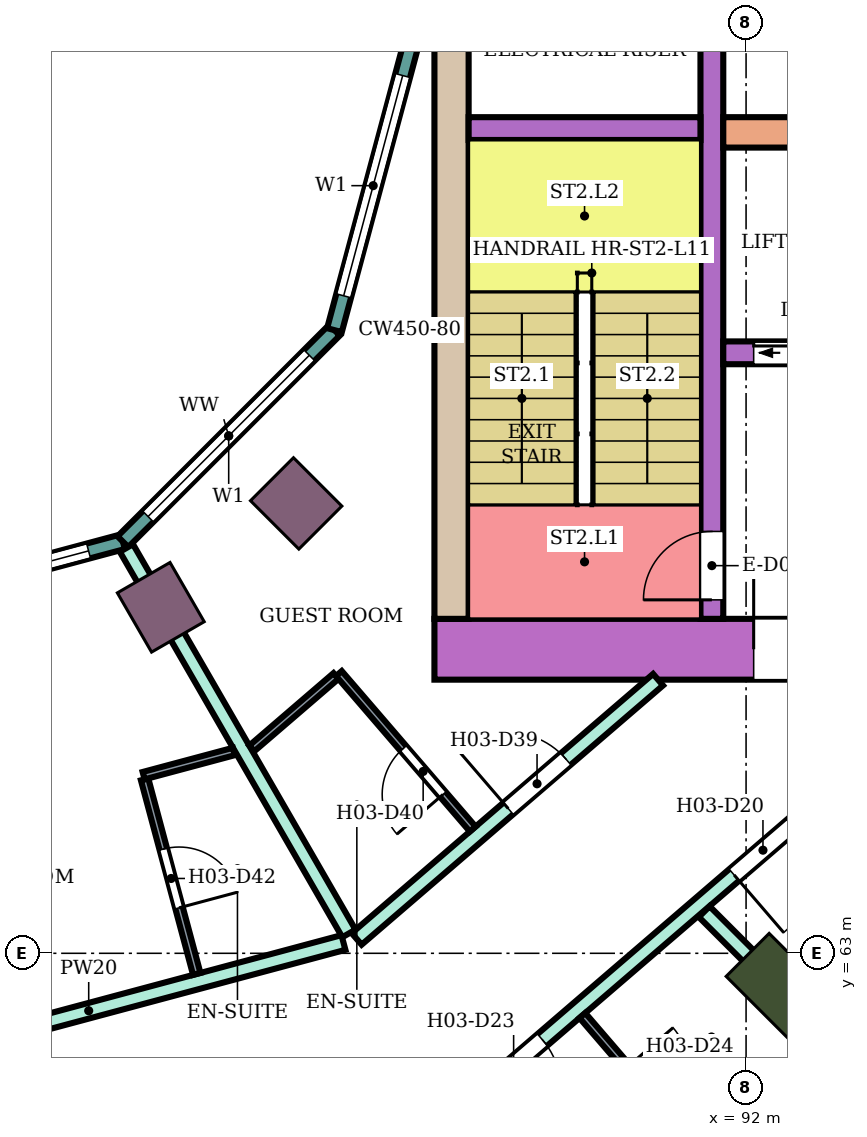
"""IFC4 building model, lengths in metres.
Left out: names, types, materials, properties, quantities, classifications, styles, units other than length and angle.
Written with IfcOpenShell. Run it as: python <this file> out.ifc"""

import sys

from ifc_helpers import new_model, si_unit, direction, frame, frame_2d, origin, origin_2d, place, context, subcontext, project, spatial, rectangle, extrude, element, fill, save


model = new_model("IFC4")
c1 = context("Model", 3, precision=1e-05, world=origin(), true_north=direction((0.0, 1.0)))
c2 = subcontext(c1, "Body", "Model", "MODEL_VIEW")
j1 = project(units=[si_unit("LENGTHUNIT", "METRE"), si_unit("PLANEANGLEUNIT", "RADIAN")], contexts=[c1])
p1 = place(None, origin())
s1 = spatial("IfcSite", under=j1, at=p1, CompositionType="ELEMENT")
p2 = place(p1, origin())
s2 = spatial("IfcBuilding", under=s1, at=p2, CompositionType="ELEMENT")
p3 = place(p2, frame((0.0, 0.0, 51.6)))
s3 = spatial("IfcBuildingStorey", under=s2, at=p3, CompositionType="ELEMENT", Elevation=51.6)
p4 = place(p3, frame((92.445, 62.555, 0.0), z_axis=(0.0, 0.0, 1.0), x_axis=(0.707106781187, -0.707106781187, 0.0)))
e1 = element("IfcColumn", 1, at=p4, inside=s3, PredefinedType="COLUMN", context=c2, shape_type="SweptSolid", body=[
    extrude(rectangle(XDim=1.2, YDim=0.8, at=origin_2d()), origin(), (0.0, 0.0, 1.0), 3.8),
])
for number, where, z_axis, x_axis in (
    (2, (84.3, 67.552, 0.0), (0.0, 0.0, 1.0), (0.5, -0.866, 0.0)),
    (3, (86.081, 68.919, 0.0), (0.0, 0.0, 1.0), (0.707, -0.707, 0.0)),
):
    element("IfcColumn", number, at=place(p3, frame(where, z_axis=z_axis, x_axis=x_axis)), inside=s3, PredefinedType="COLUMN", context=c2, shape_type="SweptSolid", body=[
        extrude(rectangle(XDim=0.9, YDim=0.8, at=origin_2d()), origin(), (0.0, 0.0, 1.0), 3.8),
    ])
p5 = place(p3, frame((87.9, 67.0, 0.0), z_axis=(0.0, 0.0, 1.0), x_axis=(1.0, 0.0, 0.0)))
e4 = element("IfcWall", 4, at=p5, inside=s3, PredefinedType="SHEAR", context=c2, shape_type="SweptSolid", body=[
    extrude(rectangle(XDim=14.7, YDim=0.8, at=frame_2d((7.35, 0.0))), origin(), (0.0, 0.0, 1.0), 3.48),
])
p6 = place(p5, frame((4.2, 0.0, 0.0)))
e5 = element("IfcOpeningElement", 5, at=p6, cuts=e4, PredefinedType="OPENING", context=c2, shape_type="SweptSolid", body=[
    extrude(rectangle(XDim=2.4, YDim=2.4, at=frame_2d((1.2, 1.2))), frame((0.0, 0.41, 0.0), z_axis=(0.0, -1.0, 0.0), x_axis=(1.0, 0.0, 0.0)), (0.0, 0.0, 1.0), 0.82),
])
p7 = place(p3, frame((88.125, 67.4, 0.0), z_axis=(0.0, 0.0, 1.0), x_axis=(0.0, 1.0, 0.0)))
e6 = element("IfcWall", 6, at=p7, inside=s3, PredefinedType="SHEAR", context=c2, shape_type="SweptSolid", body=[
    extrude(rectangle(XDim=7.6, YDim=0.45, at=frame_2d((3.8, 0.0))), origin(), (0.0, 0.0, 1.0), 3.48),
])
p8 = place(p3, frame((91.55, 67.4, 0.0), z_axis=(0.0, 0.0, 1.0), x_axis=(0.0, 1.0, 0.0)))
e7 = element("IfcWall", 7, at=p8, inside=s3, PredefinedType="SHEAR", context=c2, shape_type="SweptSolid", body=[
    extrude(rectangle(XDim=7.6, YDim=0.3, at=frame_2d((3.8, 0.0))), origin(), (0.0, 0.0, 1.0), 3.48),
])
p9 = place(p8, frame((0.25, 0.0, 0.0)))
e8 = element("IfcOpeningElement", 8, at=p9, cuts=e7, PredefinedType="OPENING", context=c2, shape_type="SweptSolid", body=[
    extrude(rectangle(XDim=0.9, YDim=2.1, at=frame_2d((0.45, 1.05))), frame((0.0, 0.16, 0.0), z_axis=(0.0, -1.0, 0.0), x_axis=(1.0, 0.0, 0.0)), (0.0, 0.0, 1.0), 0.32),
])
p10 = place(p3, frame((88.35, 73.85, 0.0), z_axis=(0.0, 0.0, 1.0), x_axis=(1.0, 0.0, 0.0)))
e9 = element("IfcWall", 9, at=p10, inside=s3, PredefinedType="SHEAR", context=c2, shape_type="SweptSolid", body=[
    extrude(rectangle(XDim=3.05, YDim=0.3, at=frame_2d((1.525, 0.0))), origin(), (0.0, 0.0, 1.0), 3.48),
])
p11 = place(p3, frame((91.7, 73.8, 0.0), z_axis=(0.0, 0.0, 1.0), x_axis=(1.0, 0.0, 0.0)))
e10 = element("IfcWall", 10, at=p11, inside=s3, PredefinedType="SHEAR", context=c2, shape_type="SweptSolid", body=[
    extrude(rectangle(XDim=10.9, YDim=0.4, at=frame_2d((5.45, 0.0))), origin(), (0.0, 0.0, 1.0), 3.48),
])
p12 = place(p3, frame((91.7, 70.9, 0.0), z_axis=(0.0, 0.0, 1.0), x_axis=(1.0, 0.0, 0.0)))
e11 = element("IfcWall", 11, at=p12, inside=s3, PredefinedType="SHEAR", context=c2, shape_type="SweptSolid", body=[
    extrude(rectangle(XDim=10.9, YDim=0.3, at=frame_2d((5.45, 0.0))), origin(), (0.0, 0.0, 1.0), 3.48),
])
p13 = place(p12, frame((0.4, 0.0, 0.0)))
e12 = element("IfcOpeningElement", 12, at=p13, cuts=e11, PredefinedType="OPENING", context=c2, shape_type="SweptSolid", body=[
    extrude(rectangle(XDim=1.4, YDim=2.1, at=frame_2d((0.7, 1.05))), frame((0.0, 0.16, 0.0), z_axis=(0.0, -1.0, 0.0), x_axis=(1.0, 0.0, 0.0)), (0.0, 0.0, 1.0), 0.32),
])
p14 = place(p12, frame((5.4, 0.0, 0.0)))
e13 = element("IfcOpeningElement", 13, at=p14, cuts=e11, PredefinedType="OPENING", context=c2, shape_type="SweptSolid", body=[
    extrude(rectangle(XDim=1.4, YDim=2.1, at=frame_2d((0.7, 1.05))), frame((0.0, 0.16, 0.0), z_axis=(0.0, -1.0, 0.0), x_axis=(1.0, 0.0, 0.0)), (0.0, 0.0, 1.0), 0.32),
])
p15 = place(p12, frame((8.1, 0.0, 0.0)))
e14 = element("IfcOpeningElement", 14, at=p15, cuts=e11, PredefinedType="OPENING", context=c2, shape_type="SweptSolid", body=[
    extrude(rectangle(XDim=1.0, YDim=2.1, at=frame_2d((0.5, 1.05))), frame((0.0, 0.16, 0.0), z_axis=(0.0, -1.0, 0.0), x_axis=(1.0, 0.0, 0.0)), (0.0, 0.0, 1.0), 0.32),
])
p16 = place(p3, frame((80.0, 67.396, 0.0), z_axis=(0.0, 0.0, 1.0), x_axis=(0.965933654434, 0.258789828301, 0.0)))
e15 = element("IfcWall", 15, at=p16, inside=s3, PredefinedType="NOTDEFINED", context=c2, shape_type="SweptSolid", body=[
    extrude(rectangle(XDim=3.936, YDim=0.2, at=frame_2d((1.968, 0.0))), origin(), (0.0, 0.0, 1.0), 3.8),
])
p17 = place(p16, frame((0.468, 0.0, 0.9)))
e16 = element("IfcOpeningElement", 16, at=p17, cuts=e15, PredefinedType="OPENING", context=c2, shape_type="SweptSolid", body=[
    extrude(rectangle(XDim=3.0, YDim=2.3, at=frame_2d((1.5, 1.15))), frame((0.0, 0.11, 0.0), z_axis=(0.0, -1.0, 0.0), x_axis=(1.0, 0.0, 0.0)), (0.0, 0.0, 1.0), 0.22),
])
p18 = place(p3, frame((83.802, 68.415, 0.0), z_axis=(0.0, 0.0, 1.0), x_axis=(0.707106781187, 0.707106781187, 0.0)))
e17 = element("IfcWall", 17, at=p18, inside=s3, PredefinedType="NOTDEFINED", context=c2, shape_type="SweptSolid", body=[
    extrude(rectangle(XDim=3.936, YDim=0.2, at=frame_2d((1.968, 0.0))), origin(), (0.0, 0.0, 1.0), 3.8),
])
p19 = place(p18, frame((0.468, 0.0, 0.9)))
e18 = element("IfcOpeningElement", 18, at=p19, cuts=e17, PredefinedType="OPENING", context=c2, shape_type="SweptSolid", body=[
    extrude(rectangle(XDim=3.0, YDim=2.3, at=frame_2d((1.5, 1.15))), frame((0.0, 0.11, 0.0), z_axis=(0.0, -1.0, 0.0), x_axis=(1.0, 0.0, 0.0)), (0.0, 0.0, 1.0), 0.22),
])
p20 = place(p3, frame((86.585, 71.198, 0.0), z_axis=(0.0, 0.0, 1.0), x_axis=(0.258789828301, 0.965933654434, 0.0)))
e19 = element("IfcWall", 19, at=p20, inside=s3, PredefinedType="NOTDEFINED", context=c2, shape_type="SweptSolid", body=[
    extrude(rectangle(XDim=3.936, YDim=0.2, at=frame_2d((1.968, 0.0))), origin(), (0.0, 0.0, 1.0), 3.8),
])
p21 = place(p20, frame((0.468, 0.0, 0.9)))
e20 = element("IfcOpeningElement", 20, at=p21, cuts=e19, PredefinedType="OPENING", context=c2, shape_type="SweptSolid", body=[
    extrude(rectangle(XDim=3.0, YDim=2.3, at=frame_2d((1.5, 1.15))), frame((0.0, 0.11, 0.0), z_axis=(0.0, -1.0, 0.0), x_axis=(1.0, 0.0, 0.0)), (0.0, 0.0, 1.0), 0.22),
])
p22 = place(p3, frame((80.0, 61.346, 0.0), z_axis=(0.0, 0.0, 1.0), x_axis=(0.965924181808, 0.258825182312, 0.0)))
e21 = element("IfcWall", 21, at=p22, inside=s3, PredefinedType="PARTITIONING", context=c2, shape_type="SweptSolid", body=[
    extrude(rectangle(XDim=6.94, YDim=0.2, at=frame_2d((3.47, 0.0))), origin(), (0.0, 0.0, 1.0), 3.35),
])
p23 = place(p22, frame((0.55, 0.0, 0.0)))
e22 = element("IfcOpeningElement", 22, at=p23, cuts=e21, PredefinedType="OPENING", context=c2, shape_type="SweptSolid", body=[
    extrude(rectangle(XDim=1.0, YDim=2.1, at=frame_2d((0.5, 1.05))), frame((0.0, 0.11, 0.0), z_axis=(0.0, -1.0, 0.0), x_axis=(1.0, 0.0, 0.0)), (0.0, 0.0, 1.0), 0.22),
])
p24 = place(p3, frame((83.848, 68.332, 0.0), z_axis=(0.0, 0.0, 1.0), x_axis=(0.499901724708, -0.866082135617, 0.0)))
e23 = element("IfcWall", 23, at=p24, inside=s3, PredefinedType="PARTITIONING", context=c2, shape_type="SweptSolid", body=[
    extrude(rectangle(XDim=5.855, YDim=0.2, at=frame_2d((2.928, 0.0))), origin(), (0.0, 0.0, 1.0), 3.35),
])
p25 = place(p3, frame((86.877, 63.189, 0.0), z_axis=(0.0, 0.0, 1.0), x_axis=(0.758164888471, 0.652062881853, 0.0)))
e24 = element("IfcWall", 24, at=p25, inside=s3, PredefinedType="PARTITIONING", context=c2, shape_type="SweptSolid", body=[
    extrude(rectangle(XDim=5.23, YDim=0.2, at=frame_2d((2.615, 0.0))), origin(), (0.0, 0.0, 1.0), 3.35),
])
p26 = place(p25, frame((2.63, 0.0, 0.0)))
e25 = element("IfcOpeningElement", 25, at=p26, cuts=e24, PredefinedType="OPENING", context=c2, shape_type="SweptSolid", body=[
    extrude(rectangle(XDim=1.0, YDim=2.1, at=frame_2d((0.5, 1.05))), frame((0.0, 0.11, 0.0), z_axis=(0.0, -1.0, 0.0), x_axis=(1.0, 0.0, 0.0)), (0.0, 0.0, 1.0), 0.22),
])
p27 = place(p3, frame((88.236, 60.929, 0.0), z_axis=(0.0, 0.0, 1.0), x_axis=(0.758227485202, 0.651990092474, 0.0)))
e26 = element("IfcWall", 26, at=p27, inside=s3, PredefinedType="PARTITIONING", context=c2, shape_type="SweptSolid", body=[
    extrude(rectangle(XDim=6.336, YDim=0.2, at=frame_2d((3.168, 0.0))), origin(), (0.0, 0.0, 1.0), 3.35),
])
p28 = place(p27, frame((4.757, 0.0, 0.0)))
e27 = element("IfcOpeningElement", 27, at=p28, cuts=e26, PredefinedType="OPENING", context=c2, shape_type="SweptSolid", body=[
    extrude(rectangle(XDim=1.0, YDim=2.1, at=frame_2d((0.5, 1.05))), frame((0.0, 0.11, 0.0), z_axis=(0.0, -1.0, 0.0), x_axis=(1.0, 0.0, 0.0)), (0.0, 0.0, 1.0), 0.22),
])
p29 = place(p27, frame((0.43, 0.0, 0.0)))
e28 = element("IfcOpeningElement", 28, at=p29, cuts=e26, PredefinedType="OPENING", context=c2, shape_type="SweptSolid", body=[
    extrude(rectangle(XDim=1.0, YDim=2.1, at=frame_2d((0.5, 1.05))), frame((0.0, 0.11, 0.0), z_axis=(0.0, -1.0, 0.0), x_axis=(1.0, 0.0, 0.0)), (0.0, 0.0, 1.0), 0.22),
])
p30 = place(p3, frame((91.449, 63.548, 0.0), z_axis=(0.0, 0.0, 1.0), x_axis=(0.706984810649, -0.707228730688, 0.0)))
e29 = element("IfcWall", 29, at=p30, inside=s3, PredefinedType="PARTITIONING", context=c2, shape_type="SweptSolid", body=[
    extrude(rectangle(XDim=7.006, YDim=0.2, at=frame_2d((3.503, 0.0))), origin(), (0.0, 0.0, 1.0), 3.35),
])
p31 = place(p3, frame((84.087, 65.289, 0.0), z_axis=(0.0, 0.0, 1.0), x_axis=(0.258929459649, -0.965896234037, 0.0)))
e30 = element("IfcWall", 30, at=p31, inside=s3, PredefinedType="PARTITIONING", context=c2, shape_type="SweptSolid", body=[
    extrude(rectangle(XDim=2.65, YDim=0.1, at=frame_2d((1.325, 0.0))), origin(), (0.0, 0.0, 1.0), 3.35),
])
p32 = place(p31, frame((0.95, 0.0, 0.0)))
e31 = element("IfcOpeningElement", 31, at=p32, cuts=e30, PredefinedType="OPENING", context=c2, shape_type="SweptSolid", body=[
    extrude(rectangle(XDim=0.8, YDim=2.1, at=frame_2d((0.4, 1.05))), frame((0.0, 0.06, 0.0), z_axis=(0.0, -1.0, 0.0), x_axis=(1.0, 0.0, 0.0)), (0.0, 0.0, 1.0), 0.12),
])
p33 = place(p3, frame((84.074, 65.337, 0.0), z_axis=(0.0, 0.0, 1.0), x_axis=(0.965914351064, 0.258861867428, 0.0)))
e32 = element("IfcWall", 32, at=p33, inside=s3, PredefinedType="PARTITIONING", context=c2, shape_type="SweptSolid", body=[
    extrude(rectangle(XDim=1.229, YDim=0.1, at=frame_2d((0.615, 0.0))), origin(), (0.0, 0.0, 1.0), 3.35),
])
p34 = place(p3, frame((85.497, 65.696, 0.0), z_axis=(0.0, 0.0, 1.0), x_axis=(0.75817032582, 0.652056559698, 0.0)))
e33 = element("IfcWall", 33, at=p34, inside=s3, PredefinedType="PARTITIONING", context=c2, shape_type="SweptSolid", body=[
    extrude(rectangle(XDim=1.461, YDim=0.1, at=frame_2d((0.73, 0.0))), origin(), (0.0, 0.0, 1.0), 3.35),
])
p35 = place(p3, frame((86.643, 66.681, 0.0), z_axis=(0.0, 0.0, 1.0), x_axis=(0.652264876065, -0.757991115682, 0.0)))
e34 = element("IfcWall", 34, at=p35, inside=s3, PredefinedType="PARTITIONING", context=c2, shape_type="SweptSolid", body=[
    extrude(rectangle(XDim=2.699, YDim=0.1, at=frame_2d((1.35, 0.0))), origin(), (0.0, 0.0, 1.0), 3.35),
])
p36 = place(p35, frame((1.3, 0.0, 0.0)))
e35 = element("IfcOpeningElement", 35, at=p36, cuts=e34, PredefinedType="OPENING", context=c2, shape_type="SweptSolid", body=[
    extrude(rectangle(XDim=0.8, YDim=2.1, at=frame_2d((0.4, 1.05))), frame((0.0, 0.06, 0.0), z_axis=(0.0, -1.0, 0.0), x_axis=(1.0, 0.0, 0.0)), (0.0, 0.0, 1.0), 0.12),
])
p37 = place(p3, frame((89.846, 62.182, 0.0), z_axis=(0.0, 0.0, 1.0), x_axis=(0.652095405055, -0.758136915541, 0.0)))
e36 = element("IfcWall", 36, at=p37, inside=s3, PredefinedType="PARTITIONING", context=c2, shape_type="SweptSolid", body=[
    extrude(rectangle(XDim=2.65, YDim=0.1, at=frame_2d((1.325, 0.0))), origin(), (0.0, 0.0, 1.0), 3.35),
])
p38 = place(p37, frame((0.9, 0.0, 0.0)))
e37 = element("IfcOpeningElement", 37, at=p38, cuts=e36, PredefinedType="OPENING", context=c2, shape_type="SweptSolid", body=[
    extrude(rectangle(XDim=0.8, YDim=2.1, at=frame_2d((0.4, 1.05))), frame((0.0, 0.06, 0.0), z_axis=(0.0, -1.0, 0.0), x_axis=(1.0, 0.0, 0.0)), (0.0, 0.0, 1.0), 0.12),
])
p39 = place(p17, origin())
e38 = element("IfcWindow", 38, at=p39, inside=s3, PartitioningType="SINGLE_PANEL", PredefinedType="WINDOW", context=c2, shape_type="SweptSolid", body=[
    extrude(rectangle(XDim=3.0, YDim=2.3, at=frame_2d((1.5, 1.15))), frame((0.0, 0.03, 0.0), z_axis=(0.0, -1.0, 0.0), x_axis=(1.0, 0.0, 0.0)), (0.0, 0.0, 1.0), 0.06),
])
fill(e16, e38)
p40 = place(p19, origin())
e39 = element("IfcWindow", 39, at=p40, inside=s3, PartitioningType="SINGLE_PANEL", PredefinedType="WINDOW", context=c2, shape_type="SweptSolid", body=[
    extrude(rectangle(XDim=3.0, YDim=2.3, at=frame_2d((1.5, 1.15))), frame((0.0, 0.03, 0.0), z_axis=(0.0, -1.0, 0.0), x_axis=(1.0, 0.0, 0.0)), (0.0, 0.0, 1.0), 0.06),
])
fill(e18, e39)
p41 = place(p21, origin())
e40 = element("IfcWindow", 40, at=p41, inside=s3, PartitioningType="SINGLE_PANEL", PredefinedType="WINDOW", context=c2, shape_type="SweptSolid", body=[
    extrude(rectangle(XDim=3.0, YDim=2.3, at=frame_2d((1.5, 1.15))), frame((0.0, 0.03, 0.0), z_axis=(0.0, -1.0, 0.0), x_axis=(1.0, 0.0, 0.0)), (0.0, 0.0, 1.0), 0.06),
])
fill(e20, e40)
p42 = place(p28, frame((1.0, 0.0, 0.0), z_axis=(0.0, 0.0, 1.0), x_axis=(-1.0, 0.0, 0.0)))
e41 = element("IfcDoor", 41, at=p42, inside=s3, OperationType="SINGLE_SWING_RIGHT", PredefinedType="DOOR", context=c2, shape_type="SweptSolid", body=[
    extrude(rectangle(XDim=1.0, YDim=2.1, at=frame_2d((0.5, 1.05))), frame((0.0, 0.025, 0.0), z_axis=(0.0, -1.0, 0.0), x_axis=(1.0, 0.0, 0.0)), (0.0, 0.0, 1.0), 0.05),
])
fill(e27, e41)
p43 = place(p29, frame((1.0, 0.0, 0.0), z_axis=(0.0, 0.0, 1.0), x_axis=(-1.0, 0.0, 0.0)))
e42 = element("IfcDoor", 42, at=p43, inside=s3, OperationType="SINGLE_SWING_RIGHT", PredefinedType="DOOR", context=c2, shape_type="SweptSolid", body=[
    extrude(rectangle(XDim=1.0, YDim=2.1, at=frame_2d((0.5, 1.05))), frame((0.0, 0.025, 0.0), z_axis=(0.0, -1.0, 0.0), x_axis=(1.0, 0.0, 0.0)), (0.0, 0.0, 1.0), 0.05),
])
fill(e28, e42)
p44 = place(p26, origin())
e43 = element("IfcDoor", 43, at=p44, inside=s3, OperationType="SINGLE_SWING_LEFT", PredefinedType="DOOR", context=c2, shape_type="SweptSolid", body=[
    extrude(rectangle(XDim=1.0, YDim=2.1, at=frame_2d((0.5, 1.05))), frame((0.0, 0.025, 0.0), z_axis=(0.0, -1.0, 0.0), x_axis=(1.0, 0.0, 0.0)), (0.0, 0.0, 1.0), 0.05),
])
fill(e25, e43)
p45 = place(p36, frame((0.8, 0.0, 0.0), z_axis=(0.0, 0.0, 1.0), x_axis=(-1.0, 0.0, 0.0)))
e44 = element("IfcDoor", 44, at=p45, inside=s3, OperationType="SINGLE_SWING_LEFT", PredefinedType="DOOR", context=c2, shape_type="SweptSolid", body=[
    extrude(rectangle(XDim=0.8, YDim=2.1, at=frame_2d((0.4, 1.05))), frame((0.0, 0.025, 0.0), z_axis=(0.0, -1.0, 0.0), x_axis=(1.0, 0.0, 0.0)), (0.0, 0.0, 1.0), 0.05),
])
fill(e35, e44)
p46 = place(p32, origin())
e45 = element("IfcDoor", 45, at=p46, inside=s3, OperationType="SINGLE_SWING_RIGHT", PredefinedType="DOOR", context=c2, shape_type="SweptSolid", body=[
    extrude(rectangle(XDim=0.8, YDim=2.1, at=frame_2d((0.4, 1.05))), frame((0.0, 0.025, 0.0), z_axis=(0.0, -1.0, 0.0), x_axis=(1.0, 0.0, 0.0)), (0.0, 0.0, 1.0), 0.05),
])
fill(e31, e45)
p47 = place(p9, origin())
e46 = element("IfcDoor", 46, at=p47, inside=s3, OperationType="SINGLE_SWING_LEFT", PredefinedType="DOOR", context=c2, shape_type="SweptSolid", body=[
    extrude(rectangle(XDim=0.9, YDim=2.1, at=frame_2d((0.45, 1.05))), frame((0.0, 0.025, 0.0), z_axis=(0.0, -1.0, 0.0), x_axis=(1.0, 0.0, 0.0)), (0.0, 0.0, 1.0), 0.05),
])
fill(e8, e46)
p48 = place(p13, origin())
e47 = element("IfcDoor", 47, at=p48, inside=s3, OperationType="DOUBLE_DOOR_SLIDING", PredefinedType="DOOR", context=c2, shape_type="SweptSolid", body=[
    extrude(rectangle(XDim=1.4, YDim=2.1, at=frame_2d((0.7, 1.05))), frame((0.0, 0.025, 0.0), z_axis=(0.0, -1.0, 0.0), x_axis=(1.0, 0.0, 0.0)), (0.0, 0.0, 1.0), 0.05),
])
fill(e12, e47)
p49 = place(p6, origin())
e48 = element("IfcDoor", 48, at=p49, inside=s3, OperationType="DOUBLE_DOOR_SINGLE_SWING", PredefinedType="DOOR", context=c2, shape_type="SweptSolid", body=[
    extrude(rectangle(XDim=2.4, YDim=2.4, at=frame_2d((1.2, 1.2))), frame((0.0, 0.025, 0.0), z_axis=(0.0, -1.0, 0.0), x_axis=(1.0, 0.0, 0.0)), (0.0, 0.0, 1.0), 0.05),
])
fill(e5, e48)
save(model, sys.argv[1])
